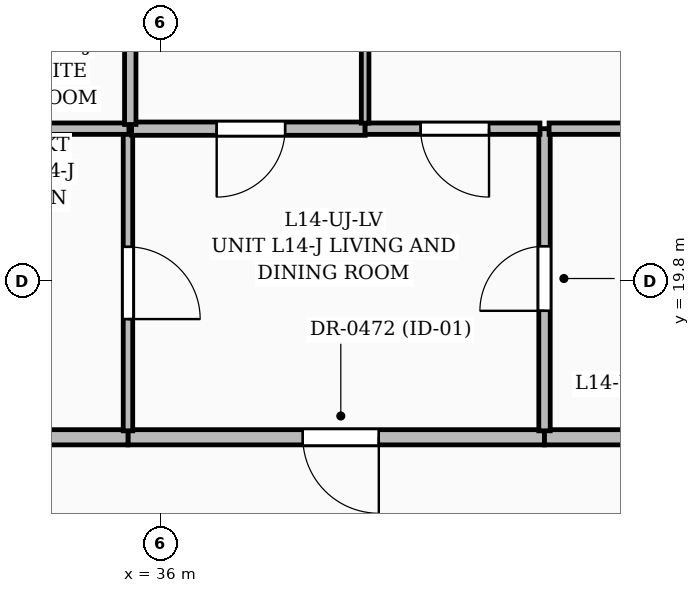
"""IFC4 building model, lengths in metres.
Left out: names, types, materials, properties, quantities, classifications, styles, units other than length and angle.
Written with IfcOpenShell. Run it as: python <this file> out.ifc"""

import sys

from ifc_helpers import new_model, si_unit, direction, frame, frame_2d, origin, place, context, subcontext, project, spatial, rectangle, extrude, element, fill, save


model = new_model("IFC4")
c1 = context("Model", 3, precision=1e-05, world=origin(), true_north=direction((0.0, 1.0)))
c2 = subcontext(c1, "Body", "Model", "MODEL_VIEW")
j1 = project(units=[si_unit("LENGTHUNIT", "METRE"), si_unit("PLANEANGLEUNIT", "RADIAN")], contexts=[c1])
p1 = place(None, origin())
s1 = spatial("IfcSite", under=j1, at=p1, CompositionType="ELEMENT")
p2 = place(p1, origin())
s2 = spatial("IfcBuilding", under=s1, at=p2, CompositionType="ELEMENT")
p3 = place(p2, frame((0.0, 0.0, 60.6)))
s3 = spatial("IfcBuildingStorey", under=s2, at=p3, CompositionType="ELEMENT", Elevation=60.6)
p4 = place(p3, frame((41.05, 17.75, 0.0), z_axis=(0.0, 0.0, 1.0), x_axis=(-1.0, 0.0, 0.0)))
e1 = element("IfcWall", 1, at=p4, inside=s3, PredefinedType="PARTITIONING", context=c2, shape_type="SweptSolid", body=[
    extrude(rectangle(XDim=5.48, YDim=0.2, at=frame_2d((2.74, 0.0))), origin(), (0.0, 0.0, 1.0), 3.35),
])
p5 = place(p4, frame((2.18, 0.0, 0.0)))
e2 = element("IfcOpeningElement", 2, at=p5, cuts=e1, PredefinedType="OPENING", context=c2, shape_type="SweptSolid", body=[
    extrude(rectangle(XDim=1.0, YDim=2.2, at=frame_2d((0.5, 1.1))), frame((0.0, 0.11, 0.0), z_axis=(0.0, -1.0, 0.0), x_axis=(1.0, 0.0, 0.0)), (0.0, 0.0, 1.0), 0.22),
])
p6 = place(p3, frame((42.85, 17.75, 0.0), z_axis=(0.0, 0.0, 1.0), x_axis=(-1.0, 0.0, 0.0)))
e3 = element("IfcWall", 3, at=p6, inside=s3, PredefinedType="PARTITIONING", context=c2, shape_type="SweptSolid", body=[
    extrude(rectangle(XDim=1.8, YDim=0.2, at=frame_2d((0.9, 0.0))), origin(), (0.0, 0.0, 1.0), 3.35),
])
p7 = place(p3, frame((35.57, 17.75, 0.0), z_axis=(0.0, 0.0, 1.0), x_axis=(-1.0, 0.0, 0.0)))
e4 = element("IfcWall", 4, at=p7, inside=s3, PredefinedType="PARTITIONING", context=c2, shape_type="SweptSolid", body=[
    extrude(rectangle(XDim=2.17, YDim=0.2, at=frame_2d((1.085, 0.0))), origin(), (0.0, 0.0, 1.0), 2.309),
])
p8 = place(p3, frame((41.05, 17.835, 0.0), z_axis=(0.0, 0.0, 1.0), x_axis=(0.0, 1.0, 0.0)))
e5 = element("IfcWall", 5, at=p8, inside=s3, PredefinedType="PARTITIONING", context=c2, shape_type="SweptSolid", body=[
    extrude(rectangle(XDim=3.975, YDim=0.15, at=frame_2d((1.988, 0.0))), origin(), (0.0, 0.0, 1.0), 3.35),
])
p9 = place(p8, frame((1.579, 0.0, 0.0)))
e6 = element("IfcOpeningElement", 6, at=p9, cuts=e5, PredefinedType="OPENING", context=c2, shape_type="SweptSolid", body=[
    extrude(rectangle(XDim=0.85, YDim=2.1, at=frame_2d((0.425, 1.05))), frame((0.0, 0.085, 0.0), z_axis=(0.0, -1.0, 0.0), x_axis=(1.0, 0.0, 0.0)), (0.0, 0.0, 1.0), 0.17),
])
p10 = place(p3, frame((35.57, 21.81, 0.0), z_axis=(0.0, 0.0, 1.0), x_axis=(0.0, -1.0, 0.0)))
e7 = element("IfcWall", 7, at=p10, inside=s3, PredefinedType="PARTITIONING", context=c2, shape_type="SweptSolid", body=[
    extrude(rectangle(XDim=3.975, YDim=0.125, at=frame_2d((1.988, 0.0))), origin(), (0.0, 0.0, 1.0), 3.35),
])
p11 = place(p10, frame((1.555, 0.0, 0.0)))
e8 = element("IfcOpeningElement", 8, at=p11, cuts=e7, PredefinedType="OPENING", context=c2, shape_type="SweptSolid", body=[
    extrude(rectangle(XDim=0.95, YDim=2.2, at=frame_2d((0.475, 1.1))), frame((0.0, 0.072, 0.0), z_axis=(0.0, -1.0, 0.0), x_axis=(1.0, 0.0, 0.0)), (0.0, 0.0, 1.0), 0.145),
])
p12 = place(p3, frame((38.69, 21.81, 0.0), z_axis=(0.0, 0.0, 1.0), x_axis=(-1.0, 0.0, 0.0)))
e9 = element("IfcWall", 9, at=p12, inside=s3, PredefinedType="PARTITIONING", context=c2, shape_type="SweptSolid", body=[
    extrude(rectangle(XDim=3.073, YDim=0.175, at=frame_2d((1.536, 0.0))), origin(), (0.0, 0.0, 1.0), 3.35),
])
p13 = place(p12, frame((1.053, 0.0, 0.0)))
e10 = element("IfcOpeningElement", 10, at=p13, cuts=e9, PredefinedType="OPENING", context=c2, shape_type="SweptSolid", body=[
    extrude(rectangle(XDim=0.9, YDim=2.15, at=frame_2d((0.45, 1.075))), frame((0.0, 0.097, 0.0), z_axis=(0.0, -1.0, 0.0), x_axis=(1.0, 0.0, 0.0)), (0.0, 0.0, 1.0), 0.195),
])
p14 = place(p3, frame((40.99, 21.81, 0.0), z_axis=(0.0, 0.0, 1.0), x_axis=(-1.0, 0.0, 0.0)))
e11 = element("IfcWall", 11, at=p14, inside=s3, PredefinedType="PARTITIONING", context=c2, shape_type="SweptSolid", body=[
    extrude(rectangle(XDim=2.3, YDim=0.15, at=frame_2d((1.15, 0.0))), origin(), (0.0, 0.0, 1.0), 3.35),
])
p15 = place(p14, frame((0.67, 0.0, 0.0)))
e12 = element("IfcOpeningElement", 12, at=p15, cuts=e11, PredefinedType="OPENING", context=c2, shape_type="SweptSolid", body=[
    extrude(rectangle(XDim=0.9, YDim=2.15, at=frame_2d((0.45, 1.075))), frame((0.0, 0.085, 0.0), z_axis=(0.0, -1.0, 0.0), x_axis=(1.0, 0.0, 0.0)), (0.0, 0.0, 1.0), 0.17),
])
p16 = place(p3, frame((42.85, 21.81, 0.0), z_axis=(0.0, 0.0, 1.0), x_axis=(-1.0, 0.0, 0.0)))
e13 = element("IfcWall", 13, at=p16, inside=s3, PredefinedType="PARTITIONING", context=c2, shape_type="SweptSolid", body=[
    extrude(rectangle(XDim=1.74, YDim=0.15, at=frame_2d((0.87, 0.0))), origin(), (0.0, 0.0, 1.0), 3.35),
])
p17 = place(p3, frame((35.583, 21.81, 0.0), z_axis=(0.0, 0.0, 1.0), x_axis=(-1.0, 0.0, 0.0)))
e14 = element("IfcWall", 14, at=p17, inside=s3, PredefinedType="PARTITIONING", context=c2, shape_type="SweptSolid", body=[
    extrude(rectangle(XDim=2.097, YDim=0.15, at=frame_2d((1.049, 0.0))), origin(), (0.0, 0.0, 1.0), 2.309),
])
p18 = place(p3, frame((38.69, 21.883, 0.0), z_axis=(0.0, 0.0, 1.0), x_axis=(0.0, 1.0, 0.0)))
e15 = element("IfcWall", 15, at=p18, inside=s3, PredefinedType="PARTITIONING", context=c2, shape_type="SweptSolid", body=[
    extrude(rectangle(XDim=4.317, YDim=0.1, at=frame_2d((2.159, 0.0))), origin(), (0.0, 0.0, 1.0), 2.37),
])
p19 = place(p3, frame((35.6, 21.865, 0.0), z_axis=(0.0, 0.0, 1.0), x_axis=(0.0, 1.0, 0.0)))
e16 = element("IfcWall", 16, at=p19, inside=s3, PredefinedType="PARTITIONING", context=c2, shape_type="SweptSolid", body=[
    extrude(rectangle(XDim=4.335, YDim=0.15, at=frame_2d((2.167, 0.0))), origin(), (0.0, 0.0, 1.0), 2.309),
])
p20 = place(p19, frame((1.715, 0.0, 0.0)))
e17 = element("IfcOpeningElement", 17, at=p20, cuts=e16, PredefinedType="OPENING", context=c2, shape_type="SweptSolid", body=[
    extrude(rectangle(XDim=0.85, YDim=2.1, at=frame_2d((0.425, 1.05))), frame((0.0, 0.085, 0.0), z_axis=(0.0, -1.0, 0.0), x_axis=(1.0, 0.0, 0.0)), (0.0, 0.0, 1.0), 0.17),
])
p21 = place(p5, origin())
e18 = element("IfcDoor", 18, at=p21, inside=s3, OperationType="SINGLE_SWING_LEFT", PredefinedType="DOOR", context=c2, shape_type="SweptSolid", body=[
    extrude(rectangle(XDim=1.0, YDim=2.2, at=frame_2d((0.5, 1.1))), frame((0.0, 0.025, 0.0), z_axis=(0.0, -1.0, 0.0), x_axis=(1.0, 0.0, 0.0)), (0.0, 0.0, 1.0), 0.05),
])
fill(e2, e18)
p22 = place(p11, origin())
e19 = element("IfcDoor", 19, at=p22, inside=s3, OperationType="SINGLE_SWING_RIGHT", PredefinedType="DOOR", context=c2, shape_type="SweptSolid", body=[
    extrude(rectangle(XDim=0.95, YDim=2.2, at=frame_2d((0.475, 1.1))), frame((0.0, 0.025, 0.0), z_axis=(0.0, -1.0, 0.0), x_axis=(1.0, 0.0, 0.0)), (0.0, 0.0, 1.0), 0.05),
])
fill(e8, e19)
p23 = place(p9, origin())
e20 = element("IfcDoor", 20, at=p23, inside=s3, OperationType="SINGLE_SWING_LEFT", PredefinedType="DOOR", context=c2, shape_type="SweptSolid", body=[
    extrude(rectangle(XDim=0.85, YDim=2.1, at=frame_2d((0.425, 1.05))), frame((0.0, 0.025, 0.0), z_axis=(0.0, -1.0, 0.0), x_axis=(1.0, 0.0, 0.0)), (0.0, 0.0, 1.0), 0.05),
])
fill(e6, e20)
p24 = place(p13, origin())
e21 = element("IfcDoor", 21, at=p24, inside=s3, OperationType="SINGLE_SWING_RIGHT", PredefinedType="DOOR", context=c2, shape_type="SweptSolid", body=[
    extrude(rectangle(XDim=0.9, YDim=2.15, at=frame_2d((0.45, 1.075))), frame((0.0, 0.025, 0.0), z_axis=(0.0, -1.0, 0.0), x_axis=(1.0, 0.0, 0.0)), (0.0, 0.0, 1.0), 0.05),
])
fill(e10, e21)
p25 = place(p15, origin())
e22 = element("IfcDoor", 22, at=p25, inside=s3, OperationType="SINGLE_SWING_LEFT", PredefinedType="DOOR", context=c2, shape_type="SweptSolid", body=[
    extrude(rectangle(XDim=0.9, YDim=2.15, at=frame_2d((0.45, 1.075))), frame((0.0, 0.025, 0.0), z_axis=(0.0, -1.0, 0.0), x_axis=(1.0, 0.0, 0.0)), (0.0, 0.0, 1.0), 0.05),
])
fill(e12, e22)
save(model, sys.argv[1])
